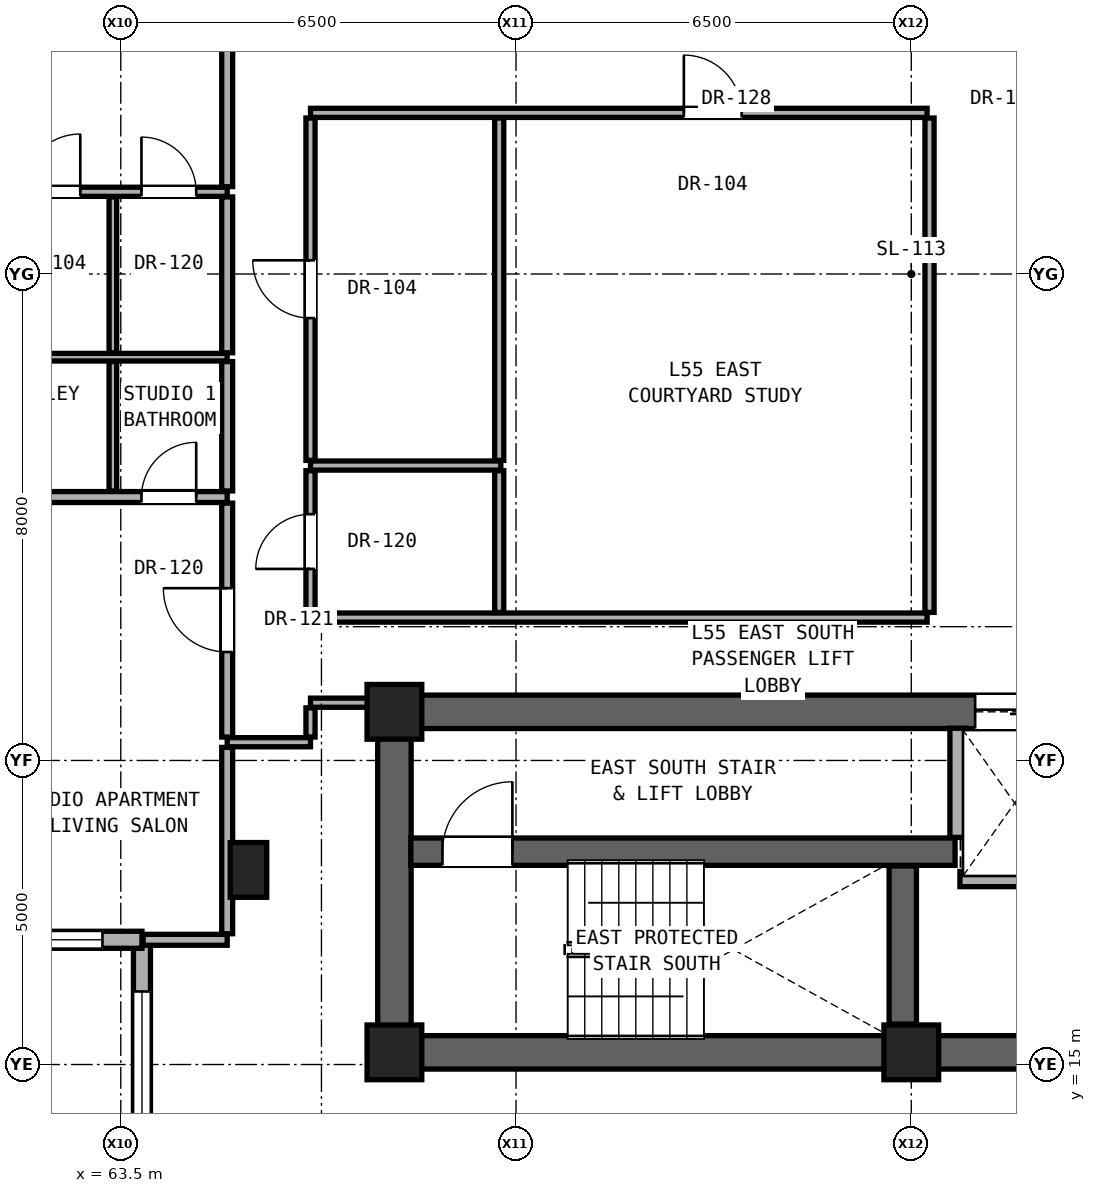
"""IFC4 building model, lengths in metres.
Left out: names, types, materials, properties, quantities, classifications, styles, units other than length and angle.
Written with IfcOpenShell. Run it as: python <this file> out.ifc"""

import sys

from ifc_helpers import new_model, si_unit, direction, frame, frame_2d, origin, origin_2d, place, context, subcontext, project, spatial, rectangle, extrude, element, fill, save


model = new_model("IFC4")
c1 = context("Model", 3, precision=1e-05, world=origin(), true_north=direction((0.0, 1.0)))
c2 = subcontext(c1, "Body", "Model", "MODEL_VIEW")
j1 = project(units=[si_unit("LENGTHUNIT", "METRE"), si_unit("PLANEANGLEUNIT", "RADIAN")], contexts=[c1])
p1 = place(None, origin())
s1 = spatial("IfcSite", under=j1, at=p1, CompositionType="ELEMENT")
p2 = place(p1, origin())
s2 = spatial("IfcBuilding", under=s1, at=p2, CompositionType="ELEMENT")
p3 = place(p2, frame((0.0, 0.0, 193.4)))
s3 = spatial("IfcBuildingStorey", under=s2, at=p3, CompositionType="ELEMENT", Elevation=193.4)
for number, where, z_axis, x_axis in (
    (1, (68.0, 15.2, 0.0), (0.0, 0.0, 1.0), (1.0, 0.0, 0.0)),
    (2, (76.5, 15.2, 0.0), (0.0, 0.0, 1.0), (1.0, 0.0, 0.0)),
    (3, (68.0, 20.8, 0.0), (0.0, 0.0, 1.0), (1.0, 0.0, 0.0)),
):
    element("IfcColumn", number, at=place(p3, frame(where, z_axis=z_axis, x_axis=x_axis)), inside=s3, PredefinedType="COLUMN", context=c2, shape_type="SweptSolid", body=[
        extrude(rectangle(XDim=0.9, YDim=0.9, at=origin_2d()), origin(), (0.0, 0.0, 1.0), 3.25),
    ])
p4 = place(p3, frame((65.6, 18.2, 0.0), z_axis=(0.0, 0.0, 1.0), x_axis=(1.0, 0.0, 0.0)))
e4 = element("IfcColumn", 4, at=p4, inside=s3, PredefinedType="PILASTER", context=c2, shape_type="SweptSolid", body=[
    extrude(rectangle(XDim=0.6, YDim=0.9, at=origin_2d()), origin(), (0.0, 0.0, 1.0), 3.25),
])
p5 = place(p3, frame((68.0, 15.2, 0.0), z_axis=(0.0, 0.0, 1.0), x_axis=(1.0, 0.0, 0.0)))
e5 = element("IfcWall", 5, at=p5, inside=s3, PredefinedType="SHEAR", context=c2, shape_type="SweptSolid", body=[
    extrude(rectangle(XDim=17.0, YDim=0.55, at=frame_2d((8.5, 0.0))), origin(), (0.0, 0.0, 1.0), 3.05),
])
p6 = place(p3, frame((68.0, 15.2, 0.0), z_axis=(0.0, 0.0, 1.0), x_axis=(0.0, 1.0, 0.0)))
e6 = element("IfcWall", 6, at=p6, inside=s3, PredefinedType="SHEAR", context=c2, shape_type="SweptSolid", body=[
    extrude(rectangle(XDim=5.6, YDim=0.55, at=frame_2d((2.8, 0.0))), origin(), (0.0, 0.0, 1.0), 3.05),
])
p7 = place(p3, frame((68.0, 20.8, 0.0), z_axis=(0.0, 0.0, 1.0), x_axis=(1.0, 0.0, 0.0)))
e7 = element("IfcWall", 7, at=p7, inside=s3, PredefinedType="SHEAR", context=c2, shape_type="SweptSolid", body=[
    extrude(rectangle(XDim=17.0, YDim=0.55, at=frame_2d((8.5, 0.0))), origin(), (0.0, 0.0, 1.0), 3.05),
])
p8 = place(p7, frame((9.55, 0.0, 0.0)))
e8 = element("IfcOpeningElement", 8, at=p8, cuts=e7, PredefinedType="OPENING", context=c2, shape_type="SweptSolid", body=[
    extrude(rectangle(XDim=1.3, YDim=2.3, at=frame_2d((0.65, 1.15))), frame((0.0, 0.285, 0.0), z_axis=(0.0, -1.0, 0.0), x_axis=(1.0, 0.0, 0.0)), (0.0, 0.0, 1.0), 0.57),
])
p9 = place(p7, frame((12.05, 0.0, 0.0)))
e9 = element("IfcOpeningElement", 9, at=p9, cuts=e7, PredefinedType="OPENING", context=c2, shape_type="SweptSolid", body=[
    extrude(rectangle(XDim=1.3, YDim=2.3, at=frame_2d((0.65, 1.15))), frame((0.0, 0.285, 0.0), z_axis=(0.0, -1.0, 0.0), x_axis=(1.0, 0.0, 0.0)), (0.0, 0.0, 1.0), 0.57),
])
p10 = place(p3, frame((63.848, 17.051, 0.0), z_axis=(0.0, 0.0, 1.0), x_axis=(0.0, -1.0, 0.0)))
e10 = element("IfcWall", 10, at=p10, inside=s3, PredefinedType="SOLIDWALL", context=c2, shape_type="SweptSolid", body=[
    extrude(rectangle(XDim=4.44, YDim=0.28, at=frame_2d((2.22, 0.0))), origin(), (0.0, 0.0, 1.0), 3.03),
])
p11 = place(p10, frame((0.85, 0.0, 0.53)))
e11 = element("IfcOpeningElement", 11, at=p11, cuts=e10, PredefinedType="OPENING", context=c2, shape_type="SweptSolid", body=[
    extrude(rectangle(XDim=2.4, YDim=2.35, at=frame_2d((1.2, 1.175))), frame((0.0, 0.15, 0.0), z_axis=(0.0, -1.0, 0.0), x_axis=(1.0, 0.0, 0.0)), (0.0, 0.0, 1.0), 0.3),
])
p12 = place(p3, frame((59.408, 17.051, 0.0), z_axis=(0.0, 0.0, 1.0), x_axis=(1.0, 0.0, 0.0)))
e12 = element("IfcWall", 12, at=p12, inside=s3, PredefinedType="SOLIDWALL", context=c2, shape_type="SweptSolid", body=[
    extrude(rectangle(XDim=4.44, YDim=0.28, at=frame_2d((2.22, 0.0))), origin(), (0.0, 0.0, 1.0), 3.03),
])
p13 = place(p12, frame((2.69, 0.0, 0.85)))
e13 = element("IfcOpeningElement", 13, at=p13, cuts=e12, PredefinedType="OPENING", context=c2, shape_type="SweptSolid", body=[
    extrude(rectangle(XDim=1.1, YDim=2.0, at=frame_2d((0.55, 1.0))), frame((0.0, 0.15, 0.0), z_axis=(0.0, -1.0, 0.0), x_axis=(1.0, 0.0, 0.0)), (0.0, 0.0, 1.0), 0.3),
])
p14 = place(p3, frame((63.868, 17.051, 0.0), z_axis=(0.0, 0.0, 1.0), x_axis=(1.0, 0.0, 0.0)))
e14 = element("IfcWall", 14, at=p14, inside=s3, PredefinedType="PARTITIONING", context=c2, shape_type="SweptSolid", body=[
    extrude(rectangle(XDim=1.382, YDim=0.18, at=frame_2d((0.691, 0.0))), origin(), (0.0, 0.0, 1.0), 3.05),
])
p15 = place(p3, frame((77.3, 18.05, 0.0), z_axis=(0.0, 0.0, 1.0), x_axis=(1.0, 0.0, 0.0)))
e15 = element("IfcWall", 15, at=p15, inside=s3, PredefinedType="SOLIDWALL", context=c2, shape_type="SweptSolid", body=[
    extrude(rectangle(XDim=4.35, YDim=0.25, at=frame_2d((2.175, 0.0))), origin(), (0.0, 0.0, 1.0), 3.05),
])
p16 = place(p3, frame((68.27, 18.5, 0.0), z_axis=(0.0, 0.0, 1.0), x_axis=(1.0, 0.0, 0.0)))
e16 = element("IfcWall", 16, at=p16, inside=s3, PredefinedType="SHEAR", context=c2, shape_type="SweptSolid", body=[
    extrude(rectangle(XDim=8.95, YDim=0.45, at=frame_2d((4.475, 0.0))), origin(), (0.0, 0.0, 1.0), 3.05),
])
p17 = place(p16, frame((0.52, 0.0, 0.0)))
e17 = element("IfcOpeningElement", 17, at=p17, cuts=e16, PredefinedType="OPENING", context=c2, shape_type="SweptSolid", body=[
    extrude(rectangle(XDim=1.15, YDim=2.2, at=frame_2d((0.575, 1.1))), frame((0.0, 0.235, 0.0), z_axis=(0.0, -1.0, 0.0), x_axis=(1.0, 0.0, 0.0)), (0.0, 0.0, 1.0), 0.47),
])
p18 = place(p3, frame((65.25, 20.3, 0.0), z_axis=(0.0, 0.0, 1.0), x_axis=(1.0, 0.0, 0.0)))
e18 = element("IfcWall", 18, at=p18, inside=s3, PredefinedType="PARTITIONING", context=c2, shape_type="SweptSolid", body=[
    extrude(rectangle(XDim=1.37, YDim=0.15, at=frame_2d((0.685, 0.0))), origin(), (0.0, 0.0, 1.0), 3.05),
])
p19 = place(p3, frame((66.62, 20.95, 0.0), z_axis=(0.0, 0.0, 1.0), x_axis=(1.0, 0.0, 0.0)))
e19 = element("IfcWall", 19, at=p19, inside=s3, PredefinedType="PARTITIONING", context=c2, shape_type="SweptSolid", body=[
    extrude(rectangle(XDim=1.11, YDim=0.15, at=frame_2d((0.555, 0.0))), origin(), (0.0, 0.0, 1.0), 2.442),
])
p20 = place(p3, frame((66.62, 22.35, 0.0), z_axis=(0.0, 0.0, 1.0), x_axis=(1.0, 0.0, 0.0)))
e20 = element("IfcWall", 20, at=p20, inside=s3, PredefinedType="PARTITIONING", context=c2, shape_type="SweptSolid", body=[
    extrude(rectangle(XDim=10.14, YDim=0.15, at=frame_2d((5.07, 0.0))), origin(), (0.0, 0.0, 1.0), 2.186),
])
p21 = place(p3, frame((59.408, 24.332, 0.0), z_axis=(0.0, 0.0, 1.0), x_axis=(1.0, 0.0, 0.0)))
e21 = element("IfcWall", 21, at=p21, inside=s3, PredefinedType="PARTITIONING", context=c2, shape_type="SweptSolid", body=[
    extrude(rectangle(XDim=5.842, YDim=0.18, at=frame_2d((2.921, 0.0))), origin(), (0.0, 0.0, 1.0), 2.269),
])
p22 = place(p21, frame((1.526, 0.0, 0.0)))
e22 = element("IfcOpeningElement", 22, at=p22, cuts=e21, PredefinedType="OPENING", context=c2, shape_type="SweptSolid", body=[
    extrude(rectangle(XDim=0.95, YDim=2.15, at=frame_2d((0.475, 1.075))), frame((0.0, 0.1, 0.0), z_axis=(0.0, -1.0, 0.0), x_axis=(1.0, 0.0, 0.0)), (0.0, 0.0, 1.0), 0.2),
])
p23 = place(p21, frame((4.432, 0.0, 0.0)))
e23 = element("IfcOpeningElement", 23, at=p23, cuts=e21, PredefinedType="OPENING", context=c2, shape_type="SweptSolid", body=[
    extrude(rectangle(XDim=0.9, YDim=2.1, at=frame_2d((0.45, 1.05))), frame((0.0, 0.1, 0.0), z_axis=(0.0, -1.0, 0.0), x_axis=(1.0, 0.0, 0.0)), (0.0, 0.0, 1.0), 0.2),
])
p24 = place(p3, frame((66.62, 24.85, 0.0), z_axis=(0.0, 0.0, 1.0), x_axis=(1.0, 0.0, 0.0)))
e24 = element("IfcWall", 24, at=p24, inside=s3, PredefinedType="PARTITIONING", context=c2, shape_type="SweptSolid", body=[
    extrude(rectangle(XDim=3.13, YDim=0.15, at=frame_2d((1.565, 0.0))), origin(), (0.0, 0.0, 1.0), 2.186),
])
p25 = place(p3, frame((59.408, 26.632, 0.0), z_axis=(0.0, 0.0, 1.0), x_axis=(1.0, 0.0, 0.0)))
e25 = element("IfcWall", 25, at=p25, inside=s3, PredefinedType="PARTITIONING", context=c2, shape_type="SweptSolid", body=[
    extrude(rectangle(XDim=5.842, YDim=0.125, at=frame_2d((2.921, 0.0))), origin(), (0.0, 0.0, 1.0), 2.269),
])
p26 = place(p3, frame((59.408, 29.352, 0.0), z_axis=(0.0, 0.0, 1.0), x_axis=(1.0, 0.0, 0.0)))
e26 = element("IfcWall", 26, at=p26, inside=s3, PredefinedType="PARTITIONING", context=c2, shape_type="SweptSolid", body=[
    extrude(rectangle(XDim=5.842, YDim=0.15, at=frame_2d((2.921, 0.0))), origin(), (0.0, 0.0, 1.0), 2.269),
])
p27 = place(p26, frame((2.476, 0.0, 0.0)))
e27 = element("IfcOpeningElement", 27, at=p27, cuts=e26, PredefinedType="OPENING", context=c2, shape_type="SweptSolid", body=[
    extrude(rectangle(XDim=0.95, YDim=2.15, at=frame_2d((0.475, 1.075))), frame((0.0, 0.085, 0.0), z_axis=(0.0, -1.0, 0.0), x_axis=(1.0, 0.0, 0.0)), (0.0, 0.0, 1.0), 0.17),
])
p28 = place(p26, frame((4.432, 0.0, 0.0)))
e28 = element("IfcOpeningElement", 28, at=p28, cuts=e26, PredefinedType="OPENING", context=c2, shape_type="SweptSolid", body=[
    extrude(rectangle(XDim=0.9, YDim=2.1, at=frame_2d((0.45, 1.05))), frame((0.0, 0.085, 0.0), z_axis=(0.0, -1.0, 0.0), x_axis=(1.0, 0.0, 0.0)), (0.0, 0.0, 1.0), 0.17),
])
p29 = place(p3, frame((66.62, 30.65, 0.0), z_axis=(0.0, 0.0, 1.0), x_axis=(1.0, 0.0, 0.0)))
e29 = element("IfcWall", 29, at=p29, inside=s3, PredefinedType="PARTITIONING", context=c2, shape_type="SweptSolid", body=[
    extrude(rectangle(XDim=10.14, YDim=0.15, at=frame_2d((5.07, 0.0))), origin(), (0.0, 0.0, 1.0), 2.186),
])
p30 = place(p29, frame((6.14, 0.0, 0.0)))
e30 = element("IfcOpeningElement", 30, at=p30, cuts=e29, PredefinedType="OPENING", context=c2, shape_type="SweptSolid", body=[
    extrude(rectangle(XDim=0.95, YDim=2.15, at=frame_2d((0.475, 1.075))), frame((0.0, 0.085, 0.0), z_axis=(0.0, -1.0, 0.0), x_axis=(1.0, 0.0, 0.0)), (0.0, 0.0, 1.0), 0.17),
])
p31 = place(p3, frame((63.37, 24.432, 0.0), z_axis=(0.0, 0.0, 1.0), x_axis=(0.0, 1.0, 0.0)))
e31 = element("IfcWall", 31, at=p31, inside=s3, PredefinedType="PARTITIONING", context=c2, shape_type="SweptSolid", body=[
    extrude(rectangle(XDim=2.128, YDim=0.125, at=frame_2d((1.064, 0.0))), origin(), (0.0, 0.0, 1.0), 3.05),
])
p32 = place(p3, frame((63.37, 26.705, 0.0), z_axis=(0.0, 0.0, 1.0), x_axis=(0.0, 1.0, 0.0)))
e32 = element("IfcWall", 32, at=p32, inside=s3, PredefinedType="PARTITIONING", context=c2, shape_type="SweptSolid", body=[
    extrude(rectangle(XDim=2.562, YDim=0.125, at=frame_2d((1.281, 0.0))), origin(), (0.0, 0.0, 1.0), 2.346),
])
p33 = place(p3, frame((65.25, 17.151, 0.0), z_axis=(0.0, 0.0, 1.0), x_axis=(0.0, 1.0, 0.0)))
e33 = element("IfcWall", 33, at=p33, inside=s3, PredefinedType="PARTITIONING", context=c2, shape_type="SweptSolid", body=[
    extrude(rectangle(XDim=3.064, YDim=0.18, at=frame_2d((1.532, 0.0))), origin(), (0.0, 0.0, 1.0), 2.493),
])
p34 = place(p3, frame((65.25, 20.385, 0.0), z_axis=(0.0, 0.0, 1.0), x_axis=(0.0, 1.0, 0.0)))
e34 = element("IfcWall", 34, at=p34, inside=s3, PredefinedType="PARTITIONING", context=c2, shape_type="SweptSolid", body=[
    extrude(rectangle(XDim=3.847, YDim=0.18, at=frame_2d((1.923, 0.0))), origin(), (0.0, 0.0, 1.0), 2.442),
])
p35 = place(p34, frame((1.398, 0.0, 0.0)))
e35 = element("IfcOpeningElement", 35, at=p35, cuts=e34, PredefinedType="OPENING", context=c2, shape_type="SweptSolid", body=[
    extrude(rectangle(XDim=1.05, YDim=2.2, at=frame_2d((0.525, 1.1))), frame((0.0, 0.1, 0.0), z_axis=(0.0, -1.0, 0.0), x_axis=(1.0, 0.0, 0.0)), (0.0, 0.0, 1.0), 0.2),
])
p36 = place(p3, frame((65.25, 24.432, 0.0), z_axis=(0.0, 0.0, 1.0), x_axis=(0.0, 1.0, 0.0)))
e36 = element("IfcWall", 36, at=p36, inside=s3, PredefinedType="PARTITIONING", context=c2, shape_type="SweptSolid", body=[
    extrude(rectangle(XDim=2.128, YDim=0.18, at=frame_2d((1.064, 0.0))), origin(), (0.0, 0.0, 1.0), 3.05),
])
p37 = place(p3, frame((65.25, 26.705, 0.0), z_axis=(0.0, 0.0, 1.0), x_axis=(0.0, 1.0, 0.0)))
e37 = element("IfcWall", 37, at=p37, inside=s3, PredefinedType="PARTITIONING", context=c2, shape_type="SweptSolid", body=[
    extrude(rectangle(XDim=2.562, YDim=0.18, at=frame_2d((1.281, 0.0))), origin(), (0.0, 0.0, 1.0), 2.346),
])
p38 = place(p3, frame((65.25, 29.437, 0.0), z_axis=(0.0, 0.0, 1.0), x_axis=(0.0, 1.0, 0.0)))
e38 = element("IfcWall", 38, at=p38, inside=s3, PredefinedType="PARTITIONING", context=c2, shape_type="SweptSolid", body=[
    extrude(rectangle(XDim=6.178, YDim=0.18, at=frame_2d((3.089, 0.0))), origin(), (0.0, 0.0, 1.0), 2.442),
])
p39 = place(p38, frame((2.564, 0.0, 0.0)))
e39 = element("IfcOpeningElement", 39, at=p39, cuts=e38, PredefinedType="OPENING", context=c2, shape_type="SweptSolid", body=[
    extrude(rectangle(XDim=1.05, YDim=2.2, at=frame_2d((0.525, 1.1))), frame((0.0, 0.1, 0.0), z_axis=(0.0, -1.0, 0.0), x_axis=(1.0, 0.0, 0.0)), (0.0, 0.0, 1.0), 0.2),
])
p40 = place(p3, frame((66.62, 20.385, 0.0), z_axis=(0.0, 0.0, 1.0), x_axis=(0.0, 1.0, 0.0)))
e40 = element("IfcWall", 40, at=p40, inside=s3, PredefinedType="PARTITIONING", context=c2, shape_type="SweptSolid", body=[
    extrude(rectangle(XDim=0.48, YDim=0.15, at=frame_2d((0.24, 0.0))), origin(), (0.0, 0.0, 1.0), 2.442),
])
p41 = place(p3, frame((66.62, 22.435, 0.0), z_axis=(0.0, 0.0, 1.0), x_axis=(0.0, 1.0, 0.0)))
e41 = element("IfcWall", 41, at=p41, inside=s3, PredefinedType="PARTITIONING", context=c2, shape_type="SweptSolid", body=[
    extrude(rectangle(XDim=2.33, YDim=0.15, at=frame_2d((1.165, 0.0))), origin(), (0.0, 0.0, 1.0), 3.05),
])
p42 = place(p41, frame((0.715, 0.0, 0.0)))
e42 = element("IfcOpeningElement", 42, at=p42, cuts=e41, PredefinedType="OPENING", context=c2, shape_type="SweptSolid", body=[
    extrude(rectangle(XDim=0.9, YDim=2.1, at=frame_2d((0.45, 1.05))), frame((0.0, 0.085, 0.0), z_axis=(0.0, -1.0, 0.0), x_axis=(1.0, 0.0, 0.0)), (0.0, 0.0, 1.0), 0.17),
])
p43 = place(p3, frame((66.62, 24.935, 0.0), z_axis=(0.0, 0.0, 1.0), x_axis=(0.0, 1.0, 0.0)))
e43 = element("IfcWall", 43, at=p43, inside=s3, PredefinedType="PARTITIONING", context=c2, shape_type="SweptSolid", body=[
    extrude(rectangle(XDim=5.63, YDim=0.15, at=frame_2d((2.815, 0.0))), origin(), (0.0, 0.0, 1.0), 2.346),
])
p44 = place(p43, frame((2.34, 0.0, 0.0)))
e44 = element("IfcOpeningElement", 44, at=p44, cuts=e43, PredefinedType="OPENING", context=c2, shape_type="SweptSolid", body=[
    extrude(rectangle(XDim=0.95, YDim=2.15, at=frame_2d((0.475, 1.075))), frame((0.0, 0.085, 0.0), z_axis=(0.0, -1.0, 0.0), x_axis=(1.0, 0.0, 0.0)), (0.0, 0.0, 1.0), 0.17),
])
p45 = place(p3, frame((69.723, 22.435, 0.0), z_axis=(0.0, 0.0, 1.0), x_axis=(0.0, 1.0, 0.0)))
e45 = element("IfcWall", 45, at=p45, inside=s3, PredefinedType="PARTITIONING", context=c2, shape_type="SweptSolid", body=[
    extrude(rectangle(XDim=2.33, YDim=0.15, at=frame_2d((1.165, 0.0))), origin(), (0.0, 0.0, 1.0), 3.05),
])
p46 = place(p3, frame((69.723, 24.935, 0.0), z_axis=(0.0, 0.0, 1.0), x_axis=(0.0, 1.0, 0.0)))
e46 = element("IfcWall", 46, at=p46, inside=s3, PredefinedType="PARTITIONING", context=c2, shape_type="SweptSolid", body=[
    extrude(rectangle(XDim=5.63, YDim=0.15, at=frame_2d((2.815, 0.0))), origin(), (0.0, 0.0, 1.0), 2.186),
])
p47 = place(p3, frame((76.36, 15.665, 0.0), z_axis=(0.0, 0.0, 1.0), x_axis=(0.0, 1.0, 0.0)))
e47 = element("IfcWall", 47, at=p47, inside=s3, PredefinedType="SHEAR", context=c2, shape_type="SweptSolid", body=[
    extrude(rectangle(XDim=2.6, YDim=0.45, at=frame_2d((1.3, 0.0))), origin(), (0.0, 0.0, 1.0), 3.05),
])
p48 = place(p3, frame((76.8, 22.435, 0.0), z_axis=(0.0, 0.0, 1.0), x_axis=(0.0, 1.0, 0.0)))
e48 = element("IfcWall", 48, at=p48, inside=s3, PredefinedType="PARTITIONING", context=c2, shape_type="SweptSolid", body=[
    extrude(rectangle(XDim=8.13, YDim=0.15, at=frame_2d((4.065, 0.0))), origin(), (0.0, 0.0, 1.0), 2.186),
])
p49 = place(p3, frame((77.26, 18.735, 0.0), z_axis=(0.0, 0.0, 1.0), x_axis=(0.0, 1.0, 0.0)))
e49 = element("IfcWall", 49, at=p49, inside=s3, PredefinedType="SOLIDWALL", context=c2, shape_type="SweptSolid", body=[
    extrude(rectangle(XDim=1.795, YDim=0.25, at=frame_2d((0.897, 0.0))), origin(), (0.0, 0.0, 1.0), 3.05),
])
p50 = place(p11, origin())
e50 = element("IfcWindow", 50, at=p50, inside=s3, PartitioningType="SINGLE_PANEL", PredefinedType="WINDOW", context=c2, shape_type="SweptSolid", body=[
    extrude(rectangle(XDim=2.4, YDim=2.35, at=frame_2d((1.2, 1.175))), frame((0.0, 0.03, 0.0), z_axis=(0.0, -1.0, 0.0), x_axis=(1.0, 0.0, 0.0)), (0.0, 0.0, 1.0), 0.06),
])
fill(e11, e50)
p51 = place(p13, origin())
e51 = element("IfcWindow", 51, at=p51, inside=s3, PartitioningType="SINGLE_PANEL", PredefinedType="WINDOW", context=c2, shape_type="SweptSolid", body=[
    extrude(rectangle(XDim=1.1, YDim=2.0, at=frame_2d((0.55, 1.0))), frame((0.0, 0.03, 0.0), z_axis=(0.0, -1.0, 0.0), x_axis=(1.0, 0.0, 0.0)), (0.0, 0.0, 1.0), 0.06),
])
fill(e13, e51)
p52 = place(p17, origin())
e52 = element("IfcDoor", 52, at=p52, inside=s3, OperationType="SINGLE_SWING_RIGHT", PredefinedType="DOOR", context=c2, shape_type="SweptSolid", body=[
    extrude(rectangle(XDim=1.15, YDim=2.2, at=frame_2d((0.575, 1.1))), frame((0.0, 0.025, 0.0), z_axis=(0.0, -1.0, 0.0), x_axis=(1.0, 0.0, 0.0)), (0.0, 0.0, 1.0), 0.05),
])
fill(e17, e52)
p53 = place(p42, origin())
e53 = element("IfcDoor", 53, at=p53, inside=s3, OperationType="SINGLE_SWING_LEFT", PredefinedType="DOOR", context=c2, shape_type="SweptSolid", body=[
    extrude(rectangle(XDim=0.9, YDim=2.1, at=frame_2d((0.45, 1.05))), frame((0.0, 0.025, 0.0), z_axis=(0.0, -1.0, 0.0), x_axis=(1.0, 0.0, 0.0)), (0.0, 0.0, 1.0), 0.05),
])
fill(e42, e53)
p54 = place(p35, origin())
e54 = element("IfcDoor", 54, at=p54, inside=s3, OperationType="SINGLE_SWING_RIGHT", PredefinedType="DOOR", context=c2, shape_type="SweptSolid", body=[
    extrude(rectangle(XDim=1.05, YDim=2.2, at=frame_2d((0.525, 1.1))), frame((0.0, 0.025, 0.0), z_axis=(0.0, -1.0, 0.0), x_axis=(1.0, 0.0, 0.0)), (0.0, 0.0, 1.0), 0.05),
])
fill(e35, e54)
p55 = place(p23, origin())
e55 = element("IfcDoor", 55, at=p55, inside=s3, OperationType="SINGLE_SWING_RIGHT", PredefinedType="DOOR", context=c2, shape_type="SweptSolid", body=[
    extrude(rectangle(XDim=0.9, YDim=2.1, at=frame_2d((0.45, 1.05))), frame((0.0, 0.025, 0.0), z_axis=(0.0, -1.0, 0.0), x_axis=(1.0, 0.0, 0.0)), (0.0, 0.0, 1.0), 0.05),
])
fill(e23, e55)
p56 = place(p27, origin())
e56 = element("IfcDoor", 56, at=p56, inside=s3, OperationType="SINGLE_SWING_RIGHT", PredefinedType="DOOR", context=c2, shape_type="SweptSolid", body=[
    extrude(rectangle(XDim=0.95, YDim=2.15, at=frame_2d((0.475, 1.075))), frame((0.0, 0.025, 0.0), z_axis=(0.0, -1.0, 0.0), x_axis=(1.0, 0.0, 0.0)), (0.0, 0.0, 1.0), 0.05),
])
fill(e27, e56)
p57 = place(p28, origin())
e57 = element("IfcDoor", 57, at=p57, inside=s3, OperationType="SINGLE_SWING_LEFT", PredefinedType="DOOR", context=c2, shape_type="SweptSolid", body=[
    extrude(rectangle(XDim=0.9, YDim=2.1, at=frame_2d((0.45, 1.05))), frame((0.0, 0.025, 0.0), z_axis=(0.0, -1.0, 0.0), x_axis=(1.0, 0.0, 0.0)), (0.0, 0.0, 1.0), 0.05),
])
fill(e28, e57)
p58 = place(p44, origin())
e58 = element("IfcDoor", 58, at=p58, inside=s3, OperationType="SINGLE_SWING_RIGHT", PredefinedType="DOOR", context=c2, shape_type="SweptSolid", body=[
    extrude(rectangle(XDim=0.95, YDim=2.15, at=frame_2d((0.475, 1.075))), frame((0.0, 0.025, 0.0), z_axis=(0.0, -1.0, 0.0), x_axis=(1.0, 0.0, 0.0)), (0.0, 0.0, 1.0), 0.05),
])
fill(e44, e58)
p59 = place(p30, origin())
e59 = element("IfcDoor", 59, at=p59, inside=s3, OperationType="SINGLE_SWING_LEFT", PredefinedType="DOOR", context=c2, shape_type="SweptSolid", body=[
    extrude(rectangle(XDim=0.95, YDim=2.15, at=frame_2d((0.475, 1.075))), frame((0.0, 0.025, 0.0), z_axis=(0.0, -1.0, 0.0), x_axis=(1.0, 0.0, 0.0)), (0.0, 0.0, 1.0), 0.05),
])
fill(e30, e59)
p60 = place(p8, origin())
e60 = element("IfcDoor", 60, at=p60, inside=s3, OperationType="DOUBLE_DOOR_SLIDING", PredefinedType="DOOR", context=c2, shape_type="SweptSolid", body=[
    extrude(rectangle(XDim=1.3, YDim=2.3, at=frame_2d((0.65, 1.15))), frame((0.0, 0.025, 0.0), z_axis=(0.0, -1.0, 0.0), x_axis=(1.0, 0.0, 0.0)), (0.0, 0.0, 1.0), 0.05),
])
fill(e8, e60)
save(model, sys.argv[1])
